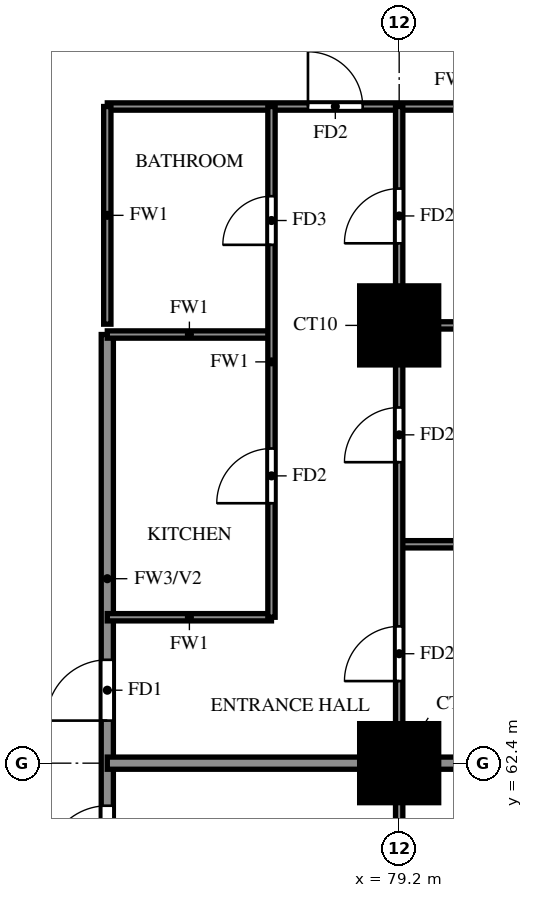
"""IFC4 building model, lengths in metres.
Left out: names, types, materials, properties, quantities, classifications, styles, units other than length and angle.
Written with IfcOpenShell. Run it as: python <this file> out.ifc"""

import sys

from ifc_helpers import new_model, si_unit, direction, frame, frame_2d, origin, origin_2d, place, context, subcontext, project, spatial, rectangle, extrude, source, transform, mapped, element, fill, save


model = new_model("IFC4")
c1 = context("Model", 3, precision=1e-05, world=origin(), true_north=direction((0.0, 1.0)))
c2 = subcontext(c1, "Body", "Model", "MODEL_VIEW")
j1 = project(units=[si_unit("LENGTHUNIT", "METRE"), si_unit("PLANEANGLEUNIT", "RADIAN")], contexts=[c1])
p1 = place(None, origin())
s1 = spatial("IfcSite", under=j1, at=p1, CompositionType="ELEMENT")
p2 = place(p1, origin())
s2 = spatial("IfcBuilding", under=s1, at=p2, CompositionType="ELEMENT")
p3 = place(p2, frame((0.0, 0.0, 76.0)))
s3 = spatial("IfcBuildingStorey", under=s2, at=p3, CompositionType="ELEMENT", Elevation=76.0)
m1 = source(origin(), c2, "Body", "SweptSolid", [
    extrude(rectangle(XDim=1.3, YDim=1.3, at=origin_2d()), origin(), (0.0, 0.0, 1.0), 3.18),
])
for number, where, z_axis, x_axis in (
    (1, (79.2, 62.4, 0.0), (0.0, 0.0, 1.0), (1.0, 0.0, 0.0)),
    (2, (79.2, 69.6, 0.0), (0.0, 0.0, 1.0), (1.0, 0.0, 0.0)),
):
    element("IfcColumn", number, at=place(p3, frame(where, z_axis=z_axis, x_axis=x_axis)), inside=s3, PredefinedType="COLUMN", context=c2, shape_type="MappedRepresentation", body=[
        mapped(m1, transform((0.0, 0.0, 0.0))),
    ])
p4 = place(p3, frame((74.4, 60.0, 0.0), z_axis=(0.0, 0.0, 1.0), x_axis=(0.0, 1.0, 0.0)))
e3 = element("IfcWall", 3, at=p4, inside=s3, PredefinedType="SOLIDWALL", context=c2, shape_type="SweptSolid", body=[
    extrude(rectangle(XDim=9.45, YDim=0.2, at=frame_2d((4.725, 0.0))), origin(), (0.0, 0.0, 1.0), 3.18),
])
p5 = place(p4, frame((0.7, 0.0, 0.0)))
e4 = element("IfcOpeningElement", 4, at=p5, cuts=e3, PredefinedType="OPENING", context=c2, shape_type="SweptSolid", body=[
    extrude(rectangle(XDim=1.0, YDim=2.1, at=frame_2d((0.5, 1.05))), frame((0.0, 0.11, 0.0), z_axis=(0.0, -1.0, 0.0), x_axis=(1.0, 0.0, 0.0)), (0.0, 0.0, 1.0), 0.22),
])
p6 = place(p4, frame((3.1, 0.0, 0.0)))
e5 = element("IfcOpeningElement", 5, at=p6, cuts=e3, PredefinedType="OPENING", context=c2, shape_type="SweptSolid", body=[
    extrude(rectangle(XDim=1.0, YDim=2.1, at=frame_2d((0.5, 1.05))), frame((0.0, 0.11, 0.0), z_axis=(0.0, -1.0, 0.0), x_axis=(1.0, 0.0, 0.0)), (0.0, 0.0, 1.0), 0.22),
])
p7 = place(p3, frame((74.4, 62.4, 0.0), z_axis=(0.0, 0.0, 1.0), x_axis=(1.0, 0.0, 0.0)))
e6 = element("IfcWall", 6, at=p7, inside=s3, PredefinedType="SOLIDWALL", context=c2, shape_type="SweptSolid", body=[
    extrude(rectangle(XDim=11.875, YDim=0.2, at=frame_2d((5.938, 0.0))), origin(), (0.0, 0.0, 1.0), 3.18),
])
p8 = place(p3, frame((74.4, 64.8, 0.0), z_axis=(0.0, 0.0, 1.0), x_axis=(1.0, 0.0, 0.0)))
e7 = element("IfcWall", 7, at=p8, inside=s3, PredefinedType="PARTITIONING", context=c2, shape_type="SweptSolid", body=[
    extrude(rectangle(XDim=2.7, YDim=0.12, at=frame_2d((1.35, 0.0))), origin(), (0.0, 0.0, 1.0), 3.18),
])
p9 = place(p3, frame((79.2, 66.0, 0.0), z_axis=(0.0, 0.0, 1.0), x_axis=(1.0, 0.0, 0.0)))
e8 = element("IfcWall", 8, at=p9, inside=s3, PredefinedType="PARTITIONING", context=c2, shape_type="SweptSolid", body=[
    extrude(rectangle(XDim=7.075, YDim=0.12, at=frame_2d((3.538, 0.0))), origin(), (0.0, 0.0, 1.0), 2.28),
])
p10 = place(p3, frame((74.4, 69.45, 0.0), z_axis=(0.0, 0.0, 1.0), x_axis=(1.0, 0.0, 0.0)))
e9 = element("IfcWall", 9, at=p10, inside=s3, PredefinedType="PARTITIONING", context=c2, shape_type="SweptSolid", body=[
    extrude(rectangle(XDim=2.7, YDim=0.12, at=frame_2d((1.35, 0.0))), origin(), (0.0, 0.0, 1.0), 3.18),
])
p11 = place(p3, frame((79.2, 69.6, 0.0), z_axis=(0.0, 0.0, 1.0), x_axis=(1.0, 0.0, 0.0)))
e10 = element("IfcWall", 10, at=p11, inside=s3, PredefinedType="PARTITIONING", context=c2, shape_type="SweptSolid", body=[
    extrude(rectangle(XDim=7.075, YDim=0.12, at=frame_2d((3.538, 0.0))), origin(), (0.0, 0.0, 1.0), 3.18),
])
p12 = place(p3, frame((74.4, 73.2, 0.0), z_axis=(0.0, 0.0, 1.0), x_axis=(1.0, 0.0, 0.0)))
e11 = element("IfcWall", 11, at=p12, inside=s3, PredefinedType="PARTITIONING", context=c2, shape_type="SweptSolid", body=[
    extrude(rectangle(XDim=11.875, YDim=0.12, at=frame_2d((5.938, 0.0))), origin(), (0.0, 0.0, 1.0), 2.28),
])
p13 = place(p12, frame((3.3, 0.0, 0.0)))
e12 = element("IfcOpeningElement", 12, at=p13, cuts=e11, PredefinedType="OPENING", context=c2, shape_type="SweptSolid", body=[
    extrude(rectangle(XDim=0.9, YDim=2.1, at=frame_2d((0.45, 1.05))), frame((0.0, 0.07, 0.0), z_axis=(0.0, -1.0, 0.0), x_axis=(1.0, 0.0, 0.0)), (0.0, 0.0, 1.0), 0.14),
])
p14 = place(p3, frame((74.4, 69.62, 0.0), z_axis=(0.0, 0.0, 1.0), x_axis=(0.0, 1.0, 0.0)))
e13 = element("IfcWall", 13, at=p14, inside=s3, PredefinedType="PARTITIONING", context=c2, shape_type="SweptSolid", body=[
    extrude(rectangle(XDim=3.58, YDim=0.12, at=frame_2d((1.79, 0.0))), origin(), (0.0, 0.0, 1.0), 3.18),
])
p15 = place(p3, frame((77.1, 64.8, 0.0), z_axis=(0.0, 0.0, 1.0), x_axis=(0.0, 1.0, 0.0)))
e14 = element("IfcWall", 14, at=p15, inside=s3, PredefinedType="PARTITIONING", context=c2, shape_type="SweptSolid", body=[
    extrude(rectangle(XDim=8.4, YDim=0.12, at=frame_2d((4.2, 0.0))), origin(), (0.0, 0.0, 1.0), 3.18),
])
p16 = place(p15, frame((1.875, 0.0, 0.0)))
e15 = element("IfcOpeningElement", 15, at=p16, cuts=e14, PredefinedType="OPENING", context=c2, shape_type="SweptSolid", body=[
    extrude(rectangle(XDim=0.9, YDim=2.1, at=frame_2d((0.45, 1.05))), frame((0.0, 0.07, 0.0), z_axis=(0.0, -1.0, 0.0), x_axis=(1.0, 0.0, 0.0)), (0.0, 0.0, 1.0), 0.14),
])
p17 = place(p15, frame((6.125, 0.0, 0.0)))
e16 = element("IfcOpeningElement", 16, at=p17, cuts=e14, PredefinedType="OPENING", context=c2, shape_type="SweptSolid", body=[
    extrude(rectangle(XDim=0.8, YDim=2.1, at=frame_2d((0.4, 1.05))), frame((0.0, 0.07, 0.0), z_axis=(0.0, -1.0, 0.0), x_axis=(1.0, 0.0, 0.0)), (0.0, 0.0, 1.0), 0.14),
])
p18 = place(p3, frame((79.2, 48.125, 0.0), z_axis=(0.0, 0.0, 1.0), x_axis=(0.0, 1.0, 0.0)))
e17 = element("IfcWall", 17, at=p18, inside=s3, PredefinedType="PARTITIONING", context=c2, shape_type="SweptSolid", body=[
    extrude(rectangle(XDim=25.075, YDim=0.12, at=frame_2d((12.538, 0.0))), origin(), (0.0, 0.0, 1.0), 3.18),
])
p19 = place(p18, frame((2.788, 0.0, 0.0)))
e18 = element("IfcOpeningElement", 18, at=p19, cuts=e17, PredefinedType="OPENING", context=c2, shape_type="SweptSolid", body=[
    extrude(rectangle(XDim=1.5, YDim=2.1, at=frame_2d((0.75, 1.05))), frame((0.0, 0.07, 0.0), z_axis=(0.0, -1.0, 0.0), x_axis=(1.0, 0.0, 0.0)), (0.0, 0.0, 1.0), 0.14),
])
p20 = place(p18, frame((8.425, 0.0, 0.0)))
e19 = element("IfcOpeningElement", 19, at=p20, cuts=e17, PredefinedType="OPENING", context=c2, shape_type="SweptSolid", body=[
    extrude(rectangle(XDim=0.9, YDim=2.1, at=frame_2d((0.45, 1.05))), frame((0.0, 0.07, 0.0), z_axis=(0.0, -1.0, 0.0), x_axis=(1.0, 0.0, 0.0)), (0.0, 0.0, 1.0), 0.14),
])
p21 = place(p18, frame((12.025, 0.0, 0.0)))
e20 = element("IfcOpeningElement", 20, at=p21, cuts=e17, PredefinedType="OPENING", context=c2, shape_type="SweptSolid", body=[
    extrude(rectangle(XDim=0.9, YDim=2.1, at=frame_2d((0.45, 1.05))), frame((0.0, 0.07, 0.0), z_axis=(0.0, -1.0, 0.0), x_axis=(1.0, 0.0, 0.0)), (0.0, 0.0, 1.0), 0.14),
])
p22 = place(p18, frame((15.625, 0.0, 0.0)))
e21 = element("IfcOpeningElement", 21, at=p22, cuts=e17, PredefinedType="OPENING", context=c2, shape_type="SweptSolid", body=[
    extrude(rectangle(XDim=0.9, YDim=2.1, at=frame_2d((0.45, 1.05))), frame((0.0, 0.07, 0.0), z_axis=(0.0, -1.0, 0.0), x_axis=(1.0, 0.0, 0.0)), (0.0, 0.0, 1.0), 0.14),
])
p23 = place(p18, frame((19.225, 0.0, 0.0)))
e22 = element("IfcOpeningElement", 22, at=p23, cuts=e17, PredefinedType="OPENING", context=c2, shape_type="SweptSolid", body=[
    extrude(rectangle(XDim=0.9, YDim=2.1, at=frame_2d((0.45, 1.05))), frame((0.0, 0.07, 0.0), z_axis=(0.0, -1.0, 0.0), x_axis=(1.0, 0.0, 0.0)), (0.0, 0.0, 1.0), 0.14),
])
p24 = place(p18, frame((22.825, 0.0, 0.0)))
e23 = element("IfcOpeningElement", 23, at=p24, cuts=e17, PredefinedType="OPENING", context=c2, shape_type="SweptSolid", body=[
    extrude(rectangle(XDim=0.9, YDim=2.1, at=frame_2d((0.45, 1.05))), frame((0.0, 0.07, 0.0), z_axis=(0.0, -1.0, 0.0), x_axis=(1.0, 0.0, 0.0)), (0.0, 0.0, 1.0), 0.14),
])
p25 = place(p5, origin())
e24 = element("IfcDoor", 24, at=p25, inside=s3, OperationType="SINGLE_SWING_RIGHT", PredefinedType="DOOR", context=c2, shape_type="SweptSolid", body=[
    extrude(rectangle(XDim=1.0, YDim=2.1, at=frame_2d((0.5, 1.05))), frame((0.0, 0.025, 0.0), z_axis=(0.0, -1.0, 0.0), x_axis=(1.0, 0.0, 0.0)), (0.0, 0.0, 1.0), 0.05),
])
fill(e4, e24)
p26 = place(p6, origin())
e25 = element("IfcDoor", 25, at=p26, inside=s3, OperationType="SINGLE_SWING_RIGHT", PredefinedType="DOOR", context=c2, shape_type="SweptSolid", body=[
    extrude(rectangle(XDim=1.0, YDim=2.1, at=frame_2d((0.5, 1.05))), frame((0.0, 0.025, 0.0), z_axis=(0.0, -1.0, 0.0), x_axis=(1.0, 0.0, 0.0)), (0.0, 0.0, 1.0), 0.05),
])
fill(e5, e25)
p27 = place(p22, origin())
e26 = element("IfcDoor", 26, at=p27, inside=s3, OperationType="SINGLE_SWING_LEFT", PredefinedType="DOOR", context=c2, shape_type="SweptSolid", body=[
    extrude(rectangle(XDim=0.9, YDim=2.1, at=frame_2d((0.45, 1.05))), frame((0.0, 0.025, 0.0), z_axis=(0.0, -1.0, 0.0), x_axis=(1.0, 0.0, 0.0)), (0.0, 0.0, 1.0), 0.05),
])
fill(e21, e26)
p28 = place(p23, origin())
e27 = element("IfcDoor", 27, at=p28, inside=s3, OperationType="SINGLE_SWING_LEFT", PredefinedType="DOOR", context=c2, shape_type="SweptSolid", body=[
    extrude(rectangle(XDim=0.9, YDim=2.1, at=frame_2d((0.45, 1.05))), frame((0.0, 0.025, 0.0), z_axis=(0.0, -1.0, 0.0), x_axis=(1.0, 0.0, 0.0)), (0.0, 0.0, 1.0), 0.05),
])
fill(e22, e27)
p29 = place(p24, origin())
e28 = element("IfcDoor", 28, at=p29, inside=s3, OperationType="SINGLE_SWING_RIGHT", PredefinedType="DOOR", context=c2, shape_type="SweptSolid", body=[
    extrude(rectangle(XDim=0.9, YDim=2.1, at=frame_2d((0.45, 1.05))), frame((0.0, 0.025, 0.0), z_axis=(0.0, -1.0, 0.0), x_axis=(1.0, 0.0, 0.0)), (0.0, 0.0, 1.0), 0.05),
])
fill(e23, e28)
p30 = place(p13, origin())
e29 = element("IfcDoor", 29, at=p30, inside=s3, OperationType="SINGLE_SWING_LEFT", PredefinedType="DOOR", context=c2, shape_type="SweptSolid", body=[
    extrude(rectangle(XDim=0.9, YDim=2.1, at=frame_2d((0.45, 1.05))), frame((0.0, 0.025, 0.0), z_axis=(0.0, -1.0, 0.0), x_axis=(1.0, 0.0, 0.0)), (0.0, 0.0, 1.0), 0.05),
])
fill(e12, e29)
p31 = place(p16, origin())
e30 = element("IfcDoor", 30, at=p31, inside=s3, OperationType="SINGLE_SWING_LEFT", PredefinedType="DOOR", context=c2, shape_type="SweptSolid", body=[
    extrude(rectangle(XDim=0.9, YDim=2.1, at=frame_2d((0.45, 1.05))), frame((0.0, 0.025, 0.0), z_axis=(0.0, -1.0, 0.0), x_axis=(1.0, 0.0, 0.0)), (0.0, 0.0, 1.0), 0.05),
])
fill(e15, e30)
p32 = place(p17, origin())
e31 = element("IfcDoor", 31, at=p32, inside=s3, OperationType="SINGLE_SWING_RIGHT", PredefinedType="DOOR", context=c2, shape_type="SweptSolid", body=[
    extrude(rectangle(XDim=0.8, YDim=2.1, at=frame_2d((0.4, 1.05))), frame((0.0, 0.025, 0.0), z_axis=(0.0, -1.0, 0.0), x_axis=(1.0, 0.0, 0.0)), (0.0, 0.0, 1.0), 0.05),
])
fill(e16, e31)
save(model, sys.argv[1])
